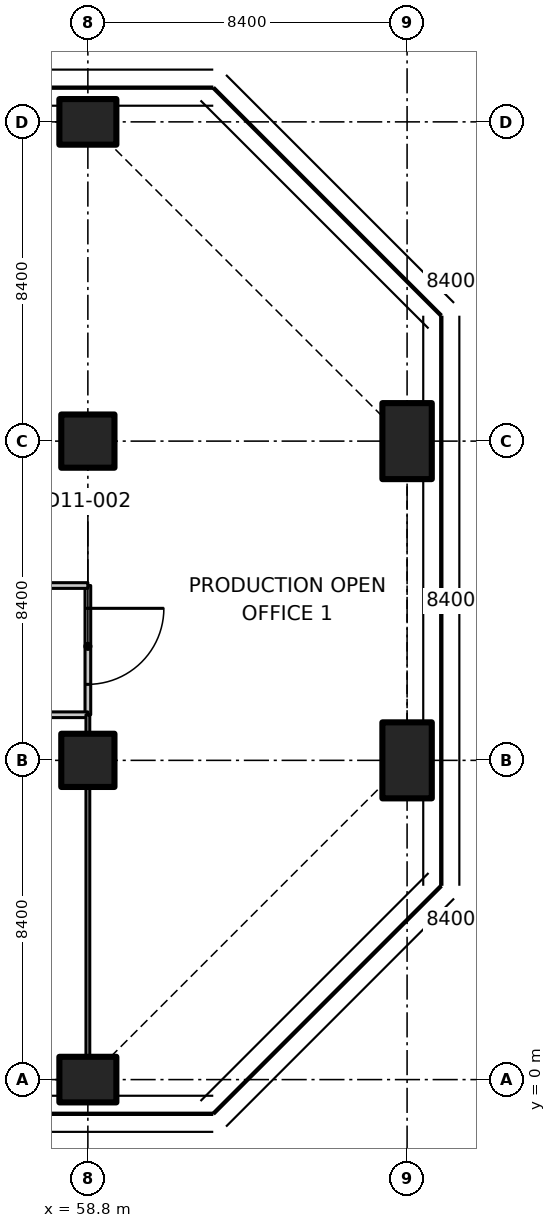
"""IFC4 building model, lengths in metres.
Left out: names, types, materials, properties, quantities, classifications, styles, units other than length and angle.
Written with IfcOpenShell. Run it as: python <this file> out.ifc"""

import sys

from ifc_helpers import new_model, si_unit, direction, frame, frame_2d, origin, origin_2d, place, context, subcontext, project, spatial, rectangle, extrude, element, fill, save


model = new_model("IFC4")
c1 = context("Model", 3, precision=1e-05, world=origin(), true_north=direction((0.0, 1.0)))
c2 = subcontext(c1, "Body", "Model", "MODEL_VIEW")
j1 = project(units=[si_unit("LENGTHUNIT", "METRE"), si_unit("PLANEANGLEUNIT", "RADIAN")], contexts=[c1])
p1 = place(None, origin())
s1 = spatial("IfcSite", under=j1, at=p1, CompositionType="ELEMENT")
p2 = place(p1, origin())
s2 = spatial("IfcBuilding", under=s1, at=p2, CompositionType="ELEMENT")
p3 = place(p2, frame((0.0, 0.0, 79.7)))
s3 = spatial("IfcBuildingStorey", under=s2, at=p3, CompositionType="ELEMENT", Elevation=79.7)
p4 = place(p3, frame((58.8, 0.0, 0.0), z_axis=(0.0, 0.0, 1.0), x_axis=(0.0, 1.0, 0.0)))
e1 = element("IfcColumn", 1, at=p4, inside=s3, PredefinedType="COLUMN", context=c2, shape_type="SweptSolid", body=[
    extrude(rectangle(XDim=1.2, YDim=1.5, at=origin_2d()), origin(), (0.0, 0.0, 1.0), 3.35),
])
for number, where, z_axis, x_axis in (
    (2, (58.8, 8.4, 0.0), (0.0, 0.0, 1.0), (1.0, 0.0, 0.0)),
    (3, (58.8, 16.8, 0.0), (0.0, 0.0, 1.0), (1.0, 0.0, 0.0)),
):
    element("IfcColumn", number, at=place(p3, frame(where, z_axis=z_axis, x_axis=x_axis)), inside=s3, PredefinedType="COLUMN", context=c2, shape_type="SweptSolid", body=[
        extrude(rectangle(XDim=1.4, YDim=1.4, at=origin_2d()), origin(), (0.0, 0.0, 1.0), 3.35),
    ])
p5 = place(p3, frame((58.8, 25.2, 0.0), z_axis=(0.0, 0.0, 1.0), x_axis=(0.0, 1.0, 0.0)))
e4 = element("IfcColumn", 4, at=p5, inside=s3, PredefinedType="COLUMN", context=c2, shape_type="SweptSolid", body=[
    extrude(rectangle(XDim=1.2, YDim=1.5, at=origin_2d()), origin(), (0.0, 0.0, 1.0), 3.35),
])
for number, where, z_axis, x_axis in (
    (5, (67.2, 8.4, 0.0), (0.0, 0.0, 1.0), (1.0, 0.0, 0.0)),
    (6, (67.2, 16.8, 0.0), (0.0, 0.0, 1.0), (1.0, 0.0, 0.0)),
):
    element("IfcColumn", number, at=place(p3, frame(where, z_axis=z_axis, x_axis=x_axis)), inside=s3, PredefinedType="COLUMN", context=c2, shape_type="SweptSolid", body=[
        extrude(rectangle(XDim=1.3, YDim=2.0, at=origin_2d()), origin(), (0.0, 0.0, 1.0), 3.35),
    ])
p6 = place(p3, frame((58.8, 13.0, 0.0), z_axis=(0.0, 0.0, 1.0), x_axis=(0.0, -1.0, 0.0)))
e7 = element("IfcWall", 7, at=p6, inside=s3, PredefinedType="PARTITIONING", context=c2, shape_type="SweptSolid", body=[
    extrude(rectangle(XDim=3.4, YDim=0.15, at=frame_2d((1.7, 0.0))), origin(), (0.0, 0.0, 1.0), 3.33),
])
p7 = place(p6, frame((0.6, 0.0, 0.0)))
e8 = element("IfcOpeningElement", 8, at=p7, cuts=e7, PredefinedType="OPENING", context=c2, shape_type="SweptSolid", body=[
    extrude(rectangle(XDim=2.0, YDim=2.4, at=frame_2d((1.0, 1.2))), frame((0.0, 0.085, 0.0), z_axis=(0.0, -1.0, 0.0), x_axis=(1.0, 0.0, 0.0)), (0.0, 0.0, 1.0), 0.17),
])
p8 = place(p3, frame((58.8, 9.6, 0.0), z_axis=(0.0, 0.0, 1.0), x_axis=(-1.0, 0.0, 0.0)))
e9 = element("IfcWall", 9, at=p8, inside=s3, PredefinedType="PARTITIONING", context=c2, shape_type="SweptSolid", body=[
    extrude(rectangle(XDim=4.2, YDim=0.15, at=frame_2d((2.1, 0.0))), origin(), (0.0, 0.0, 1.0), 3.33),
])
p9 = place(p8, frame((1.5, 0.0, 0.0)))
e10 = element("IfcOpeningElement", 10, at=p9, cuts=e9, PredefinedType="OPENING", context=c2, shape_type="SweptSolid", body=[
    extrude(rectangle(XDim=1.1, YDim=2.1, at=frame_2d((0.55, 1.05))), frame((0.0, 0.085, 0.0), z_axis=(0.0, -1.0, 0.0), x_axis=(1.0, 0.0, 0.0)), (0.0, 0.0, 1.0), 0.17),
])
p10 = place(p3, frame((54.6, 13.0, 0.0), z_axis=(0.0, 0.0, 1.0), x_axis=(1.0, 0.0, 0.0)))
e11 = element("IfcWall", 11, at=p10, inside=s3, PredefinedType="PARTITIONING", context=c2, shape_type="SweptSolid", body=[
    extrude(rectangle(XDim=4.2, YDim=0.15, at=frame_2d((2.1, 0.0))), origin(), (0.0, 0.0, 1.0), 3.33),
])
p11 = place(p10, frame((1.5, 0.0, 0.0)))
e12 = element("IfcOpeningElement", 12, at=p11, cuts=e11, PredefinedType="OPENING", context=c2, shape_type="SweptSolid", body=[
    extrude(rectangle(XDim=1.1, YDim=2.1, at=frame_2d((0.55, 1.05))), frame((0.0, 0.085, 0.0), z_axis=(0.0, -1.0, 0.0), x_axis=(1.0, 0.0, 0.0)), (0.0, 0.0, 1.0), 0.17),
])
p12 = place(p3, frame((58.8, 0.62, 0.0), z_axis=(0.0, 0.0, 1.0), x_axis=(0.0, 1.0, 0.0)))
e13 = element("IfcWall", 13, at=p12, inside=s3, PredefinedType="PARTITIONING", context=c2, shape_type="SweptSolid", body=[
    extrude(rectangle(XDim=7.06, YDim=0.1, at=frame_2d((3.53, 0.0))), origin(), (0.0, 0.0, 1.0), 3.33),
])
p13 = place(p3, frame((58.8, 9.12, 0.0), z_axis=(0.0, 0.0, 1.0), x_axis=(0.0, 1.0, 0.0)))
e14 = element("IfcWall", 14, at=p13, inside=s3, PredefinedType="PARTITIONING", context=c2, shape_type="SweptSolid", body=[
    extrude(rectangle(XDim=0.48, YDim=0.1, at=frame_2d((0.24, 0.0))), origin(), (0.0, 0.0, 1.0), 3.33),
])
p14 = place(p7, origin())
e15 = element("IfcDoor", 15, at=p14, inside=s3, OperationType="DOUBLE_DOOR_SINGLE_SWING", PredefinedType="DOOR", context=c2, shape_type="SweptSolid", body=[
    extrude(rectangle(XDim=2.0, YDim=2.4, at=frame_2d((1.0, 1.2))), frame((0.0, 0.025, 0.0), z_axis=(0.0, -1.0, 0.0), x_axis=(1.0, 0.0, 0.0)), (0.0, 0.0, 1.0), 0.05),
])
fill(e8, e15)
save(model, sys.argv[1])
